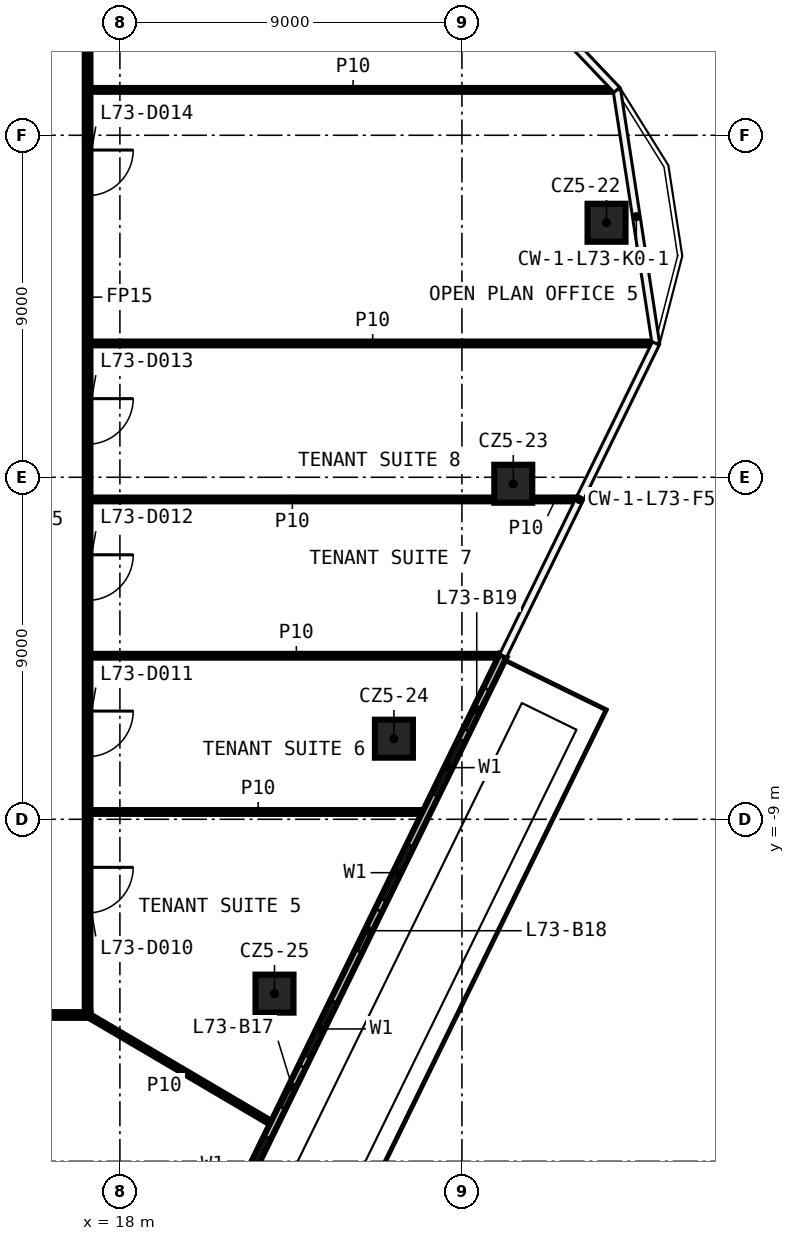
"""IFC4 building model, lengths in metres.
Left out: names, types, materials, properties, quantities, classifications, styles, units other than length and angle.
Written with IfcOpenShell. Run it as: python <this file> out.ifc"""

import sys

from ifc_helpers import new_model, si_unit, direction, frame, frame_2d, origin, origin_2d, place, context, subcontext, project, spatial, rectangle, extrude, element, fill, save


model = new_model("IFC4")
c1 = context("Model", 3, precision=1e-05, world=origin(), true_north=direction((0.0, 1.0)))
c2 = subcontext(c1, "Body", "Model", "MODEL_VIEW")
j1 = project(units=[si_unit("LENGTHUNIT", "METRE"), si_unit("PLANEANGLEUNIT", "RADIAN")], contexts=[c1])
p1 = place(None, origin())
s1 = spatial("IfcSite", under=j1, at=p1, CompositionType="ELEMENT")
p2 = place(p1, origin())
s2 = spatial("IfcBuilding", under=s1, at=p2, CompositionType="ELEMENT")
p3 = place(p2, frame((0.0, 0.0, 340.4)))
s3 = spatial("IfcBuildingStorey", under=s2, at=p3, CompositionType="ELEMENT", Elevation=340.4)
for number, where, z_axis, x_axis in (
    (1, (30.805, 6.698, 0.0), (0.0, 0.0, 1.0), (1.0, 0.0, 0.0)),
    (2, (28.351, -0.17, 0.0), (0.0, 0.0, 1.0), (1.0, 0.0, 0.0)),
    (3, (25.21, -6.879, 0.0), (0.0, 0.0, 1.0), (1.0, 0.0, 0.0)),
    (4, (22.068, -13.588, 0.0), (0.0, 0.0, 1.0), (1.0, 0.0, 0.0)),
):
    element("IfcColumn", number, at=place(p3, frame(where, z_axis=z_axis, x_axis=x_axis)), inside=s3, PredefinedType="COLUMN", context=c2, shape_type="SweptSolid", body=[
        extrude(rectangle(XDim=1.0, YDim=1.0, at=origin_2d()), origin(), (0.0, 0.0, 1.0), 3.82),
    ])
p4 = place(p3, frame((17.225, -14.15, 0.0), z_axis=(0.0, 0.0, 1.0), x_axis=(-1.0, 0.0, 0.0)))
e5 = element("IfcWall", 5, at=p4, inside=s3, PredefinedType="PARTITIONING", context=c2, shape_type="SweptSolid", body=[
    extrude(rectangle(XDim=34.45, YDim=0.15, at=frame_2d((17.225, 0.0))), origin(), (0.0, 0.0, 1.0), 3.82),
])
p5 = place(p4, frame((24.639, 0.0, 0.0)))
e6 = element("IfcOpeningElement", 6, at=p5, cuts=e5, PredefinedType="OPENING", context=c2, shape_type="SweptSolid", body=[
    extrude(rectangle(XDim=1.2, YDim=2.1, at=frame_2d((0.6, 1.05))), frame((0.0, 0.085, 0.0), z_axis=(0.0, -1.0, 0.0), x_axis=(1.0, 0.0, 0.0)), (0.0, 0.0, 1.0), 0.17),
])
p6 = place(p4, frame((20.005, 0.0, 0.0)))
e7 = element("IfcOpeningElement", 7, at=p6, cuts=e5, PredefinedType="OPENING", context=c2, shape_type="SweptSolid", body=[
    extrude(rectangle(XDim=1.2, YDim=2.1, at=frame_2d((0.6, 1.05))), frame((0.0, 0.085, 0.0), z_axis=(0.0, -1.0, 0.0), x_axis=(1.0, 0.0, 0.0)), (0.0, 0.0, 1.0), 0.17),
])
p7 = place(p4, frame((15.367, 0.0, 0.0)))
e8 = element("IfcOpeningElement", 8, at=p7, cuts=e5, PredefinedType="OPENING", context=c2, shape_type="SweptSolid", body=[
    extrude(rectangle(XDim=1.2, YDim=2.1, at=frame_2d((0.6, 1.05))), frame((0.0, 0.085, 0.0), z_axis=(0.0, -1.0, 0.0), x_axis=(1.0, 0.0, 0.0)), (0.0, 0.0, 1.0), 0.17),
])
p8 = place(p4, frame((10.73, 0.0, 0.0)))
e9 = element("IfcOpeningElement", 9, at=p8, cuts=e5, PredefinedType="OPENING", context=c2, shape_type="SweptSolid", body=[
    extrude(rectangle(XDim=1.2, YDim=2.1, at=frame_2d((0.6, 1.05))), frame((0.0, 0.085, 0.0), z_axis=(0.0, -1.0, 0.0), x_axis=(1.0, 0.0, 0.0)), (0.0, 0.0, 1.0), 0.17),
])
p9 = place(p4, frame((6.097, 0.0, 0.0)))
e10 = element("IfcOpeningElement", 10, at=p9, cuts=e5, PredefinedType="OPENING", context=c2, shape_type="SweptSolid", body=[
    extrude(rectangle(XDim=1.2, YDim=2.1, at=frame_2d((0.6, 1.05))), frame((0.0, 0.085, 0.0), z_axis=(0.0, -1.0, 0.0), x_axis=(1.0, 0.0, 0.0)), (0.0, 0.0, 1.0), 0.17),
])
p10 = place(p4, frame((1.83, 0.0, 0.0)))
e11 = element("IfcOpeningElement", 11, at=p10, cuts=e5, PredefinedType="OPENING", context=c2, shape_type="SweptSolid", body=[
    extrude(rectangle(XDim=1.2, YDim=2.1, at=frame_2d((0.6, 1.05))), frame((0.0, 0.085, 0.0), z_axis=(0.0, -1.0, 0.0), x_axis=(1.0, 0.0, 0.0)), (0.0, 0.0, 1.0), 0.17),
])
p11 = place(p3, frame((17.225, -8.808, 0.0), z_axis=(0.0, 0.0, 1.0), x_axis=(1.0, 0.0, 0.0)))
e12 = element("IfcWall", 12, at=p11, inside=s3, PredefinedType="PARTITIONING", context=c2, shape_type="SweptSolid", body=[
    extrude(rectangle(XDim=8.824, YDim=0.1, at=frame_2d((4.412, 0.0))), origin(), (0.0, 0.0, 1.0), 3.82),
])
p12 = place(p3, frame((17.225, -4.696, 0.0), z_axis=(0.0, 0.0, 1.0), x_axis=(1.0, 0.0, 0.0)))
e13 = element("IfcWall", 13, at=p12, inside=s3, PredefinedType="PARTITIONING", context=c2, shape_type="SweptSolid", body=[
    extrude(rectangle(XDim=10.835, YDim=0.1, at=frame_2d((5.417, 0.0))), origin(), (0.0, 0.0, 1.0), 3.82),
])
p13 = place(p3, frame((17.225, -0.583, 0.0), z_axis=(0.0, 0.0, 1.0), x_axis=(1.0, 0.0, 0.0)))
e14 = element("IfcWall", 14, at=p13, inside=s3, PredefinedType="PARTITIONING", context=c2, shape_type="SweptSolid", body=[
    extrude(rectangle(XDim=10.626, YDim=0.1, at=frame_2d((5.313, 0.0))), origin(), (0.0, 0.0, 1.0), 3.82),
])
p14 = place(p3, frame((28.851, -0.583, 0.0), z_axis=(0.0, 0.0, 1.0), x_axis=(1.0, 0.0, 0.0)))
e15 = element("IfcWall", 15, at=p14, inside=s3, PredefinedType="PARTITIONING", context=c2, shape_type="SweptSolid", body=[
    extrude(rectangle(XDim=1.221, YDim=0.1, at=frame_2d((0.611, 0.0))), origin(), (0.0, 0.0, 1.0), 3.82),
])
p15 = place(p3, frame((17.225, 3.522, 0.0), z_axis=(0.0, 0.0, 1.0), x_axis=(1.0, 0.0, 0.0)))
e16 = element("IfcWall", 16, at=p15, inside=s3, PredefinedType="PARTITIONING", context=c2, shape_type="SweptSolid", body=[
    extrude(rectangle(XDim=14.854, YDim=0.1, at=frame_2d((7.427, 0.0))), origin(), (0.0, 0.0, 1.0), 3.82),
])
p16 = place(p3, frame((17.225, 10.194, 0.0), z_axis=(0.0, 0.0, 1.0), x_axis=(1.0, 0.0, 0.0)))
e17 = element("IfcWall", 17, at=p16, inside=s3, PredefinedType="PARTITIONING", context=c2, shape_type="SweptSolid", body=[
    extrude(rectangle(XDim=13.823, YDim=0.1, at=frame_2d((6.912, 0.0))), origin(), (0.0, 0.0, 1.0), 3.82),
])
p17 = place(p3, frame((17.15, 14.075, 0.0), z_axis=(0.0, 0.0, 1.0), x_axis=(0.0, -1.0, 0.0)))
e18 = element("IfcWall", 18, at=p17, inside=s3, PredefinedType="PARTITIONING", context=c2, shape_type="SweptSolid", body=[
    extrude(rectangle(XDim=28.15, YDim=0.15, at=frame_2d((14.075, 0.0))), origin(), (0.0, 0.0, 1.0), 3.82),
])
p18 = place(p17, frame((24.339, 0.0, 0.0)))
e19 = element("IfcOpeningElement", 19, at=p18, cuts=e18, PredefinedType="OPENING", context=c2, shape_type="SweptSolid", body=[
    extrude(rectangle(XDim=1.2, YDim=2.1, at=frame_2d((0.6, 1.05))), frame((0.0, 0.085, 0.0), z_axis=(0.0, -1.0, 0.0), x_axis=(1.0, 0.0, 0.0)), (0.0, 0.0, 1.0), 0.17),
])
p19 = place(p17, frame((20.227, 0.0, 0.0)))
e20 = element("IfcOpeningElement", 20, at=p19, cuts=e18, PredefinedType="OPENING", context=c2, shape_type="SweptSolid", body=[
    extrude(rectangle(XDim=1.2, YDim=2.1, at=frame_2d((0.6, 1.05))), frame((0.0, 0.085, 0.0), z_axis=(0.0, -1.0, 0.0), x_axis=(1.0, 0.0, 0.0)), (0.0, 0.0, 1.0), 0.17),
])
p20 = place(p17, frame((16.115, 0.0, 0.0)))
e21 = element("IfcOpeningElement", 21, at=p20, cuts=e18, PredefinedType="OPENING", context=c2, shape_type="SweptSolid", body=[
    extrude(rectangle(XDim=1.2, YDim=2.1, at=frame_2d((0.6, 1.05))), frame((0.0, 0.085, 0.0), z_axis=(0.0, -1.0, 0.0), x_axis=(1.0, 0.0, 0.0)), (0.0, 0.0, 1.0), 0.17),
])
p21 = place(p17, frame((12.006, 0.0, 0.0)))
e22 = element("IfcOpeningElement", 22, at=p21, cuts=e18, PredefinedType="OPENING", context=c2, shape_type="SweptSolid", body=[
    extrude(rectangle(XDim=1.2, YDim=2.1, at=frame_2d((0.6, 1.05))), frame((0.0, 0.085, 0.0), z_axis=(0.0, -1.0, 0.0), x_axis=(1.0, 0.0, 0.0)), (0.0, 0.0, 1.0), 0.17),
])
p22 = place(p17, frame((5.464, 0.0, 0.0)))
e23 = element("IfcOpeningElement", 23, at=p22, cuts=e18, PredefinedType="OPENING", context=c2, shape_type="SweptSolid", body=[
    extrude(rectangle(XDim=1.2, YDim=2.1, at=frame_2d((0.6, 1.05))), frame((0.0, 0.085, 0.0), z_axis=(0.0, -1.0, 0.0), x_axis=(1.0, 0.0, 0.0)), (0.0, 0.0, 1.0), 0.17),
])
p23 = place(p17, frame((1.569, 0.0, 0.0)))
e24 = element("IfcOpeningElement", 24, at=p23, cuts=e18, PredefinedType="OPENING", context=c2, shape_type="SweptSolid", body=[
    extrude(rectangle(XDim=1.2, YDim=2.1, at=frame_2d((0.6, 1.05))), frame((0.0, 0.085, 0.0), z_axis=(0.0, -1.0, 0.0), x_axis=(1.0, 0.0, 0.0)), (0.0, 0.0, 1.0), 0.17),
])
p24 = place(p3, frame((17.15, -14.15, 0.0), z_axis=(0.0, 0.0, 1.0), x_axis=(0.861895432603, -0.507086051137, 0.0)))
e25 = element("IfcWall", 25, at=p24, inside=s3, PredefinedType="PARTITIONING", context=c2, shape_type="SweptSolid", body=[
    extrude(rectangle(XDim=5.664, YDim=0.1, at=frame_2d((2.832, 0.0))), origin(), (0.0, 0.0, 1.0), 3.82),
])
p25 = place(p3, frame((18.027, -25.256, 0.0), z_axis=(0.0, 0.0, 1.0), x_axis=(0.439336781314, 0.898322432418, 0.0)))
e26 = element("IfcWall", 26, at=p25, inside=s3, PredefinedType="SOLIDWALL", context=c2, shape_type="SweptSolid", body=[
    extrude(rectangle(XDim=22.887, YDim=0.2, at=frame_2d((11.444, 0.0))), origin(), (0.0, 0.0, 1.0), 3.82),
])
p26 = place(p25, frame((2.0, 0.0, 0.6)))
e27 = element("IfcOpeningElement", 27, at=p26, cuts=e26, PredefinedType="OPENING", context=c2, shape_type="SweptSolid", body=[
    extrude(rectangle(XDim=1.6, YDim=2.4, at=frame_2d((0.8, 1.2))), frame((0.0, 0.11, 0.0), z_axis=(0.0, -1.0, 0.0), x_axis=(1.0, 0.0, 0.0)), (0.0, 0.0, 1.0), 0.22),
])
p27 = place(p25, frame((0.5, 0.0, 0.0)))
e28 = element("IfcOpeningElement", 28, at=p27, cuts=e26, PredefinedType="OPENING", context=c2, shape_type="SweptSolid", body=[
    extrude(rectangle(XDim=1.2, YDim=2.4, at=frame_2d((0.6, 1.2))), frame((0.0, 0.11, 0.0), z_axis=(0.0, -1.0, 0.0), x_axis=(1.0, 0.0, 0.0)), (0.0, 0.0, 1.0), 0.22),
])
p28 = place(p25, frame((7.177, 0.0, 0.6)))
e29 = element("IfcOpeningElement", 29, at=p28, cuts=e26, PredefinedType="OPENING", context=c2, shape_type="SweptSolid", body=[
    extrude(rectangle(XDim=1.6, YDim=2.4, at=frame_2d((0.8, 1.2))), frame((0.0, 0.11, 0.0), z_axis=(0.0, -1.0, 0.0), x_axis=(1.0, 0.0, 0.0)), (0.0, 0.0, 1.0), 0.22),
])
p29 = place(p25, frame((5.677, 0.0, 0.0)))
e30 = element("IfcOpeningElement", 30, at=p29, cuts=e26, PredefinedType="OPENING", context=c2, shape_type="SweptSolid", body=[
    extrude(rectangle(XDim=1.2, YDim=2.4, at=frame_2d((0.6, 1.2))), frame((0.0, 0.11, 0.0), z_axis=(0.0, -1.0, 0.0), x_axis=(1.0, 0.0, 0.0)), (0.0, 0.0, 1.0), 0.22),
])
p30 = place(p25, frame((11.155, 0.0, 0.6)))
e31 = element("IfcOpeningElement", 31, at=p30, cuts=e26, PredefinedType="OPENING", context=c2, shape_type="SweptSolid", body=[
    extrude(rectangle(XDim=1.6, YDim=2.4, at=frame_2d((0.8, 1.2))), frame((0.0, 0.11, 0.0), z_axis=(0.0, -1.0, 0.0), x_axis=(1.0, 0.0, 0.0)), (0.0, 0.0, 1.0), 0.22),
])
p31 = place(p25, frame((9.655, 0.0, 0.0)))
e32 = element("IfcOpeningElement", 32, at=p31, cuts=e26, PredefinedType="OPENING", context=c2, shape_type="SweptSolid", body=[
    extrude(rectangle(XDim=1.2, YDim=2.4, at=frame_2d((0.6, 1.2))), frame((0.0, 0.11, 0.0), z_axis=(0.0, -1.0, 0.0), x_axis=(1.0, 0.0, 0.0)), (0.0, 0.0, 1.0), 0.22),
])
p32 = place(p25, frame((15.732, 0.0, 0.6)))
e33 = element("IfcOpeningElement", 33, at=p32, cuts=e26, PredefinedType="OPENING", context=c2, shape_type="SweptSolid", body=[
    extrude(rectangle(XDim=1.6, YDim=2.4, at=frame_2d((0.8, 1.2))), frame((0.0, 0.11, 0.0), z_axis=(0.0, -1.0, 0.0), x_axis=(1.0, 0.0, 0.0)), (0.0, 0.0, 1.0), 0.22),
])
p33 = place(p25, frame((14.232, 0.0, 0.0)))
e34 = element("IfcOpeningElement", 34, at=p33, cuts=e26, PredefinedType="OPENING", context=c2, shape_type="SweptSolid", body=[
    extrude(rectangle(XDim=1.2, YDim=2.4, at=frame_2d((0.6, 1.2))), frame((0.0, 0.11, 0.0), z_axis=(0.0, -1.0, 0.0), x_axis=(1.0, 0.0, 0.0)), (0.0, 0.0, 1.0), 0.22),
])
p34 = place(p25, frame((18.81, 0.0, 0.6)))
e35 = element("IfcOpeningElement", 35, at=p34, cuts=e26, PredefinedType="OPENING", context=c2, shape_type="SweptSolid", body=[
    extrude(rectangle(XDim=1.6, YDim=2.4, at=frame_2d((0.8, 1.2))), frame((0.0, 0.11, 0.0), z_axis=(0.0, -1.0, 0.0), x_axis=(1.0, 0.0, 0.0)), (0.0, 0.0, 1.0), 0.22),
])
p35 = place(p25, frame((20.71, 0.0, 0.0)))
e36 = element("IfcOpeningElement", 36, at=p35, cuts=e26, PredefinedType="OPENING", context=c2, shape_type="SweptSolid", body=[
    extrude(rectangle(XDim=1.2, YDim=2.4, at=frame_2d((0.6, 1.2))), frame((0.0, 0.11, 0.0), z_axis=(0.0, -1.0, 0.0), x_axis=(1.0, 0.0, 0.0)), (0.0, 0.0, 1.0), 0.22),
])
p36 = place(p18, origin())
e37 = element("IfcDoor", 37, at=p36, inside=s3, OperationType="SINGLE_SWING_LEFT", PredefinedType="DOOR", context=c2, shape_type="SweptSolid", body=[
    extrude(rectangle(XDim=1.2, YDim=2.1, at=frame_2d((0.6, 1.05))), frame((0.0, 0.025, 0.0), z_axis=(0.0, -1.0, 0.0), x_axis=(1.0, 0.0, 0.0)), (0.0, 0.0, 1.0), 0.05),
])
fill(e19, e37)
p37 = place(p19, origin())
e38 = element("IfcDoor", 38, at=p37, inside=s3, OperationType="SINGLE_SWING_RIGHT", PredefinedType="DOOR", context=c2, shape_type="SweptSolid", body=[
    extrude(rectangle(XDim=1.2, YDim=2.1, at=frame_2d((0.6, 1.05))), frame((0.0, 0.025, 0.0), z_axis=(0.0, -1.0, 0.0), x_axis=(1.0, 0.0, 0.0)), (0.0, 0.0, 1.0), 0.05),
])
fill(e20, e38)
p38 = place(p20, origin())
e39 = element("IfcDoor", 39, at=p38, inside=s3, OperationType="SINGLE_SWING_LEFT", PredefinedType="DOOR", context=c2, shape_type="SweptSolid", body=[
    extrude(rectangle(XDim=1.2, YDim=2.1, at=frame_2d((0.6, 1.05))), frame((0.0, 0.025, 0.0), z_axis=(0.0, -1.0, 0.0), x_axis=(1.0, 0.0, 0.0)), (0.0, 0.0, 1.0), 0.05),
])
fill(e21, e39)
p39 = place(p21, origin())
e40 = element("IfcDoor", 40, at=p39, inside=s3, OperationType="SINGLE_SWING_RIGHT", PredefinedType="DOOR", context=c2, shape_type="SweptSolid", body=[
    extrude(rectangle(XDim=1.2, YDim=2.1, at=frame_2d((0.6, 1.05))), frame((0.0, 0.025, 0.0), z_axis=(0.0, -1.0, 0.0), x_axis=(1.0, 0.0, 0.0)), (0.0, 0.0, 1.0), 0.05),
])
fill(e22, e40)
p40 = place(p22, origin())
e41 = element("IfcDoor", 41, at=p40, inside=s3, OperationType="SINGLE_SWING_LEFT", PredefinedType="DOOR", context=c2, shape_type="SweptSolid", body=[
    extrude(rectangle(XDim=1.2, YDim=2.1, at=frame_2d((0.6, 1.05))), frame((0.0, 0.025, 0.0), z_axis=(0.0, -1.0, 0.0), x_axis=(1.0, 0.0, 0.0)), (0.0, 0.0, 1.0), 0.05),
])
fill(e23, e41)
p41 = place(p28, origin())
e42 = element("IfcWindow", 42, at=p41, inside=s3, PartitioningType="SINGLE_PANEL", PredefinedType="WINDOW", context=c2, shape_type="SweptSolid", body=[
    extrude(rectangle(XDim=1.6, YDim=2.4, at=frame_2d((0.8, 1.2))), frame((0.0, 0.03, 0.0), z_axis=(0.0, -1.0, 0.0), x_axis=(1.0, 0.0, 0.0)), (0.0, 0.0, 1.0), 0.06),
])
fill(e29, e42)
p42 = place(p30, origin())
e43 = element("IfcWindow", 43, at=p42, inside=s3, PartitioningType="SINGLE_PANEL", PredefinedType="WINDOW", context=c2, shape_type="SweptSolid", body=[
    extrude(rectangle(XDim=1.6, YDim=2.4, at=frame_2d((0.8, 1.2))), frame((0.0, 0.03, 0.0), z_axis=(0.0, -1.0, 0.0), x_axis=(1.0, 0.0, 0.0)), (0.0, 0.0, 1.0), 0.06),
])
fill(e31, e43)
p43 = place(p31, origin())
e44 = element("IfcDoor", 44, at=p43, inside=s3, OperationType="SLIDING_TO_LEFT", PredefinedType="DOOR", context=c2, shape_type="SweptSolid", body=[
    extrude(rectangle(XDim=1.2, YDim=2.4, at=frame_2d((0.6, 1.2))), frame((0.0, 0.025, 0.0), z_axis=(0.0, -1.0, 0.0), x_axis=(1.0, 0.0, 0.0)), (0.0, 0.0, 1.0), 0.05),
])
fill(e32, e44)
p44 = place(p32, origin())
e45 = element("IfcWindow", 45, at=p44, inside=s3, PartitioningType="SINGLE_PANEL", PredefinedType="WINDOW", context=c2, shape_type="SweptSolid", body=[
    extrude(rectangle(XDim=1.6, YDim=2.4, at=frame_2d((0.8, 1.2))), frame((0.0, 0.03, 0.0), z_axis=(0.0, -1.0, 0.0), x_axis=(1.0, 0.0, 0.0)), (0.0, 0.0, 1.0), 0.06),
])
fill(e33, e45)
p45 = place(p33, origin())
e46 = element("IfcDoor", 46, at=p45, inside=s3, OperationType="SLIDING_TO_LEFT", PredefinedType="DOOR", context=c2, shape_type="SweptSolid", body=[
    extrude(rectangle(XDim=1.2, YDim=2.4, at=frame_2d((0.6, 1.2))), frame((0.0, 0.025, 0.0), z_axis=(0.0, -1.0, 0.0), x_axis=(1.0, 0.0, 0.0)), (0.0, 0.0, 1.0), 0.05),
])
fill(e34, e46)
p46 = place(p34, origin())
e47 = element("IfcWindow", 47, at=p46, inside=s3, PartitioningType="SINGLE_PANEL", PredefinedType="WINDOW", context=c2, shape_type="SweptSolid", body=[
    extrude(rectangle(XDim=1.6, YDim=2.4, at=frame_2d((0.8, 1.2))), frame((0.0, 0.03, 0.0), z_axis=(0.0, -1.0, 0.0), x_axis=(1.0, 0.0, 0.0)), (0.0, 0.0, 1.0), 0.06),
])
fill(e35, e47)
p47 = place(p35, origin())
e48 = element("IfcDoor", 48, at=p47, inside=s3, OperationType="SLIDING_TO_LEFT", PredefinedType="DOOR", context=c2, shape_type="SweptSolid", body=[
    extrude(rectangle(XDim=1.2, YDim=2.4, at=frame_2d((0.6, 1.2))), frame((0.0, 0.025, 0.0), z_axis=(0.0, -1.0, 0.0), x_axis=(1.0, 0.0, 0.0)), (0.0, 0.0, 1.0), 0.05),
])
fill(e36, e48)
save(model, sys.argv[1])
